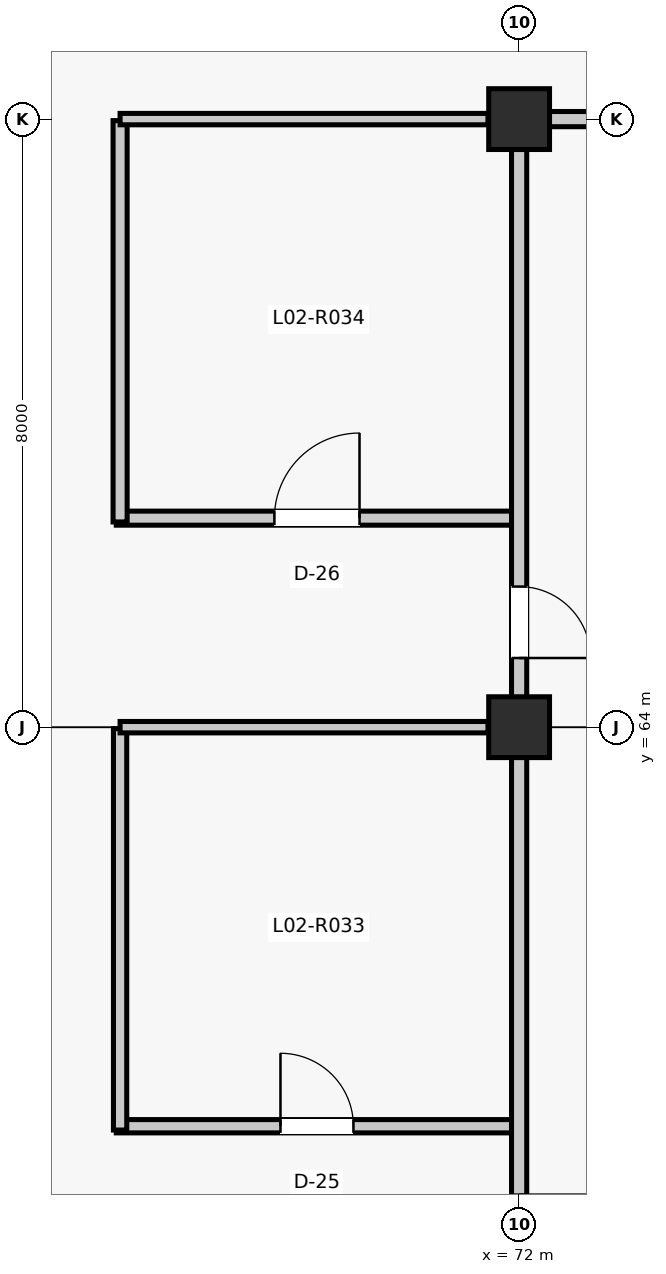
"""IFC4 building model, lengths in metres.
Left out: names, types, materials, properties, quantities, classifications, styles, units other than length and angle.
Written with IfcOpenShell. Run it as: python <this file> out.ifc"""

import sys

from ifc_helpers import new_model, si_unit, direction, frame, frame_2d, origin, origin_2d, place, context, subcontext, project, spatial, rectangle, extrude, element, fill, save


model = new_model("IFC4")
c1 = context("Model", 3, precision=1e-05, world=origin(), true_north=direction((0.0, 1.0)))
c2 = subcontext(c1, "Body", "Model", "MODEL_VIEW")
j1 = project(units=[si_unit("LENGTHUNIT", "METRE"), si_unit("PLANEANGLEUNIT", "RADIAN")], contexts=[c1])
p1 = place(None, origin())
s1 = spatial("IfcSite", under=j1, at=p1, CompositionType="ELEMENT")
p2 = place(p1, origin())
s2 = spatial("IfcBuilding", under=s1, at=p2, CompositionType="ELEMENT")
p3 = place(p2, frame((0.0, 0.0, 9.9)))
s3 = spatial("IfcBuildingStorey", under=s2, at=p3, CompositionType="ELEMENT", Elevation=9.9)
for number, where, z_axis, x_axis in (
    (1, (72.0, 64.0, 0.0), (0.0, 0.0, 1.0), (1.0, 0.0, 0.0)),
    (2, (72.0, 72.0, 0.0), (0.0, 0.0, 1.0), (1.0, 0.0, 0.0)),
):
    element("IfcColumn", number, at=place(p3, frame(where, z_axis=z_axis, x_axis=x_axis)), inside=s3, PredefinedType="COLUMN", context=c2, shape_type="SweptSolid", body=[
        extrude(rectangle(XDim=0.8, YDim=0.8, at=origin_2d()), origin(), (0.0, 0.0, 1.0), 3.96),
    ])
p4 = place(p3, frame((66.7, 58.75, 0.0), z_axis=(0.0, 0.0, 1.0), x_axis=(1.0, 0.0, 0.0)))
e3 = element("IfcWall", 3, at=p4, inside=s3, PredefinedType="PARTITIONING", context=c2, shape_type="SweptSolid", body=[
    extrude(rectangle(XDim=5.28, YDim=0.175, at=frame_2d((2.64, 0.0))), origin(), (0.0, 0.0, 1.0), 3.157),
])
p5 = place(p4, frame((2.16, 0.0, 0.0)))
e4 = element("IfcOpeningElement", 4, at=p5, cuts=e3, PredefinedType="OPENING", context=c2, shape_type="SweptSolid", body=[
    extrude(rectangle(XDim=0.96, YDim=2.14, at=frame_2d((0.48, 1.07))), frame((0.0, 0.097, 0.0), z_axis=(0.0, -1.0, 0.0), x_axis=(1.0, 0.0, 0.0)), (0.0, 0.0, 1.0), 0.195),
])
p6 = place(p3, frame((66.75, 58.7, 0.0), z_axis=(0.0, 0.0, 1.0), x_axis=(0.0, 1.0, 0.0)))
e5 = element("IfcWall", 5, at=p6, inside=s3, PredefinedType="PARTITIONING", context=c2, shape_type="SweptSolid", body=[
    extrude(rectangle(XDim=5.28, YDim=0.175, at=frame_2d((2.64, 0.0))), origin(), (0.0, 0.0, 1.0), 3.082),
])
p7 = place(p3, frame((66.75, 64.0, 0.0), z_axis=(0.0, 0.0, 1.0), x_axis=(1.0, 0.0, 0.0)))
e6 = element("IfcWall", 6, at=p7, inside=s3, PredefinedType="PARTITIONING", context=c2, shape_type="SweptSolid", body=[
    extrude(rectangle(XDim=4.84, YDim=0.15, at=frame_2d((2.42, 0.0))), origin(), (0.0, 0.0, 1.0), 3.082),
])
p8 = place(p3, frame((66.7, 66.75, 0.0), z_axis=(0.0, 0.0, 1.0), x_axis=(1.0, 0.0, 0.0)))
e7 = element("IfcWall", 7, at=p8, inside=s3, PredefinedType="PARTITIONING", context=c2, shape_type="SweptSolid", body=[
    extrude(rectangle(XDim=5.28, YDim=0.185, at=frame_2d((2.64, 0.0))), origin(), (0.0, 0.0, 1.0), 3.227),
])
p9 = place(p8, frame((2.08, 0.0, 0.0)))
e8 = element("IfcOpeningElement", 8, at=p9, cuts=e7, PredefinedType="OPENING", context=c2, shape_type="SweptSolid", body=[
    extrude(rectangle(XDim=1.12, YDim=2.22, at=frame_2d((0.56, 1.11))), frame((0.0, 0.103, 0.0), z_axis=(0.0, -1.0, 0.0), x_axis=(1.0, 0.0, 0.0)), (0.0, 0.0, 1.0), 0.205),
])
p10 = place(p3, frame((66.75, 66.7, 0.0), z_axis=(0.0, 0.0, 1.0), x_axis=(0.0, 1.0, 0.0)))
e9 = element("IfcWall", 9, at=p10, inside=s3, PredefinedType="PARTITIONING", context=c2, shape_type="SweptSolid", body=[
    extrude(rectangle(XDim=5.28, YDim=0.185, at=frame_2d((2.64, 0.0))), origin(), (0.0, 0.0, 1.0), 3.157),
])
p11 = place(p3, frame((66.75, 72.0, 0.0), z_axis=(0.0, 0.0, 1.0), x_axis=(1.0, 0.0, 0.0)))
e10 = element("IfcWall", 10, at=p11, inside=s3, PredefinedType="PARTITIONING", context=c2, shape_type="SweptSolid", body=[
    extrude(rectangle(XDim=4.84, YDim=0.15, at=frame_2d((2.42, 0.0))), origin(), (0.0, 0.0, 1.0), 3.157),
])
p12 = place(p3, frame((72.0, 56.39, 0.0), z_axis=(0.0, 0.0, 1.0), x_axis=(0.0, 1.0, 0.0)))
e11 = element("IfcWall", 11, at=p12, inside=s3, PredefinedType="PARTITIONING", context=c2, shape_type="SweptSolid", body=[
    extrude(rectangle(XDim=7.22, YDim=0.2, at=frame_2d((3.61, 0.0))), origin(), (0.0, 0.0, 1.0), 3.157),
])
p13 = place(p12, frame((0.52, 0.0, 0.0)))
e12 = element("IfcOpeningElement", 12, at=p13, cuts=e11, PredefinedType="OPENING", context=c2, shape_type="SweptSolid", body=[
    extrude(rectangle(XDim=0.94, YDim=2.12, at=frame_2d((0.47, 1.06))), frame((0.0, 0.11, 0.0), z_axis=(0.0, -1.0, 0.0), x_axis=(1.0, 0.0, 0.0)), (0.0, 0.0, 1.0), 0.22),
])
p14 = place(p3, frame((72.0, 64.39, 0.0), z_axis=(0.0, 0.0, 1.0), x_axis=(0.0, 1.0, 0.0)))
e13 = element("IfcWall", 13, at=p14, inside=s3, PredefinedType="PARTITIONING", context=c2, shape_type="SweptSolid", body=[
    extrude(rectangle(XDim=7.22, YDim=0.2, at=frame_2d((3.61, 0.0))), origin(), (0.0, 0.0, 1.0), 3.227),
])
p15 = place(p14, frame((0.52, 0.0, 0.0)))
e14 = element("IfcOpeningElement", 14, at=p15, cuts=e13, PredefinedType="OPENING", context=c2, shape_type="SweptSolid", body=[
    extrude(rectangle(XDim=0.94, YDim=2.12, at=frame_2d((0.47, 1.06))), frame((0.0, 0.11, 0.0), z_axis=(0.0, -1.0, 0.0), x_axis=(1.0, 0.0, 0.0)), (0.0, 0.0, 1.0), 0.22),
])
p16 = place(p3, frame((72.39, 72.0, 0.0), z_axis=(0.0, 0.0, 1.0), x_axis=(1.0, 0.0, 0.0)))
e15 = element("IfcWall", 15, at=p16, inside=s3, PredefinedType="PARTITIONING", context=c2, shape_type="SweptSolid", body=[
    extrude(rectangle(XDim=7.61, YDim=0.2, at=frame_2d((3.805, 0.0))), origin(), (0.0, 0.0, 1.0), 3.695),
])
p17 = place(p16, frame((3.005, 0.0, 0.0)))
e16 = element("IfcOpeningElement", 16, at=p17, cuts=e15, PredefinedType="OPENING", context=c2, shape_type="SweptSolid", body=[
    extrude(rectangle(XDim=1.6, YDim=2.25, at=frame_2d((0.8, 1.125))), frame((0.0, 0.11, 0.0), z_axis=(0.0, -1.0, 0.0), x_axis=(1.0, 0.0, 0.0)), (0.0, 0.0, 1.0), 0.22),
])
p18 = place(p5, origin())
e17 = element("IfcDoor", 17, at=p18, inside=s3, OperationType="SINGLE_SWING_LEFT", PredefinedType="DOOR", context=c2, shape_type="SweptSolid", body=[
    extrude(rectangle(XDim=0.96, YDim=2.14, at=frame_2d((0.48, 1.07))), frame((0.0, 0.025, 0.0), z_axis=(0.0, -1.0, 0.0), x_axis=(1.0, 0.0, 0.0)), (0.0, 0.0, 1.0), 0.05),
])
fill(e4, e17)
p19 = place(p9, origin())
e18 = element("IfcDoor", 18, at=p19, inside=s3, OperationType="SINGLE_SWING_RIGHT", PredefinedType="DOOR", context=c2, shape_type="SweptSolid", body=[
    extrude(rectangle(XDim=1.12, YDim=2.22, at=frame_2d((0.56, 1.11))), frame((0.0, 0.025, 0.0), z_axis=(0.0, -1.0, 0.0), x_axis=(1.0, 0.0, 0.0)), (0.0, 0.0, 1.0), 0.05),
])
fill(e8, e18)
p20 = place(p15, frame((0.94, 0.0, 0.0), z_axis=(0.0, 0.0, 1.0), x_axis=(-1.0, 0.0, 0.0)))
e19 = element("IfcDoor", 19, at=p20, inside=s3, OperationType="SINGLE_SWING_LEFT", PredefinedType="DOOR", context=c2, shape_type="SweptSolid", body=[
    extrude(rectangle(XDim=0.94, YDim=2.12, at=frame_2d((0.47, 1.06))), frame((0.0, 0.025, 0.0), z_axis=(0.0, -1.0, 0.0), x_axis=(1.0, 0.0, 0.0)), (0.0, 0.0, 1.0), 0.05),
])
fill(e14, e19)
save(model, sys.argv[1])
